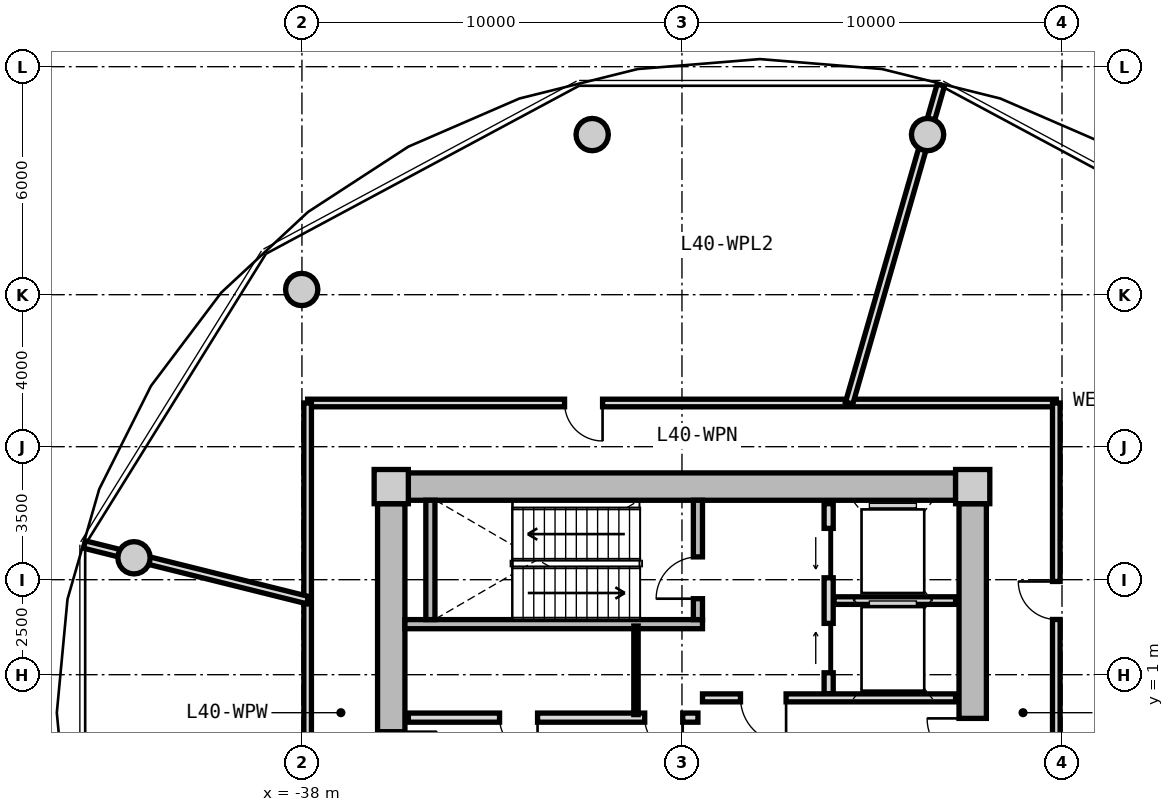
"""IFC4 building model, lengths in metres.
Left out: names, types, materials, properties, quantities, classifications, styles, units other than length and angle.
Written with IfcOpenShell. Run it as: python <this file> out.ifc"""

import sys

from ifc_helpers import new_model, si_unit, direction, frame, frame_2d, origin, origin_2d, place, context, subcontext, project, spatial, rectangle, circle, extrude, source, transform, mapped, element, fill, save


model = new_model("IFC4")
c1 = context("Model", 3, precision=1e-05, world=origin(), true_north=direction((0.0, 1.0)))
c2 = subcontext(c1, "Body", "Model", "MODEL_VIEW")
j1 = project(units=[si_unit("LENGTHUNIT", "METRE"), si_unit("PLANEANGLEUNIT", "RADIAN")], contexts=[c1])
p1 = place(None, origin())
s1 = spatial("IfcSite", under=j1, at=p1, CompositionType="ELEMENT")
p2 = place(p1, origin())
s2 = spatial("IfcBuilding", under=s1, at=p2, CompositionType="ELEMENT")
p3 = place(p2, frame((0.0, 0.0, 129.8)))
s3 = spatial("IfcBuildingStorey", under=s2, at=p3, CompositionType="ELEMENT", Elevation=129.8)
m1 = source(origin(), c2, "Body", "SweptSolid", [
    extrude(rectangle(XDim=0.9, YDim=0.9, at=origin_2d()), origin(), (0.0, 0.0, 1.0), 4.5),
])
for number, where, z_axis, x_axis in (
    (1, (-20.35, 5.95, 0.0), (0.0, 0.0, 1.0), (1.0, 0.0, 0.0)),
    (2, (-35.65, 5.95, 0.0), (0.0, 0.0, 1.0), (1.0, 0.0, 0.0)),
):
    element("IfcColumn", number, at=place(p3, frame(where, z_axis=z_axis, x_axis=x_axis)), inside=s3, PredefinedType="COLUMN", context=c2, shape_type="MappedRepresentation", body=[
        mapped(m1, transform((0.0, 0.0, 0.0), x_axis=(1.0, 0.0, 0.0), y_axis=(0.0, 1.0, 0.0), z_axis=(0.0, 0.0, 1.0), scale=1.0)),
    ])
m2 = source(origin(), c2, "Body", "SweptSolid", [
    extrude(rectangle(XDim=14.4, YDim=0.72, at=frame_2d((7.2, 0.0))), origin(), (0.0, 0.0, 1.0), 4.08),
])
p4 = place(p3, frame((-35.2, 5.95, 0.0), z_axis=(0.0, 0.0, 1.0), x_axis=(1.0, 0.0, 0.0)))
e3 = element("IfcWall", 3, at=p4, inside=s3, PredefinedType="SHEAR", context=c2, shape_type="MappedRepresentation", body=[
    mapped(m2, transform((0.0, 0.0, 0.0), x_axis=(1.0, 0.0, 0.0), y_axis=(0.0, 1.0, 0.0), z_axis=(0.0, 0.0, 1.0), scale=1.0)),
])
m3 = source(origin(), c2, "Body", "SweptSolid", [
    extrude(rectangle(XDim=11.0, YDim=0.72, at=frame_2d((5.5, 0.0))), origin(), (0.0, 0.0, 1.0), 4.08),
])
p5 = place(p3, frame((-35.65, -5.5, 0.0), z_axis=(0.0, 0.0, 1.0), x_axis=(0.0, 1.0, 0.0)))
e4 = element("IfcWall", 4, at=p5, inside=s3, PredefinedType="SHEAR", context=c2, shape_type="MappedRepresentation", body=[
    mapped(m3, transform((0.0, 0.0, 0.0), x_axis=(1.0, 0.0, 0.0), y_axis=(0.0, 1.0, 0.0), z_axis=(0.0, 0.0, 1.0), scale=1.0)),
])
p6 = place(p5, frame((3.8, 0.0, 0.0)))
e5 = element("IfcOpeningElement", 5, at=p6, cuts=e4, PredefinedType="OPENING", context=c2, shape_type="SweptSolid", body=[
    extrude(rectangle(XDim=1.2, YDim=2.15, at=frame_2d((0.6, 1.075))), frame((0.0, 0.37, 0.0), z_axis=(0.0, -1.0, 0.0), x_axis=(1.0, 0.0, 0.0)), (0.0, 0.0, 1.0), 0.74),
])
p7 = place(p3, frame((-20.35, 5.5, 0.0), z_axis=(0.0, 0.0, 1.0), x_axis=(0.0, -1.0, 0.0)))
e6 = element("IfcWall", 6, at=p7, inside=s3, PredefinedType="SHEAR", context=c2, shape_type="MappedRepresentation", body=[
    mapped(m3, transform((0.0, 0.0, 0.0), x_axis=(1.0, 0.0, 0.0), y_axis=(0.0, 1.0, 0.0), z_axis=(0.0, 0.0, 1.0), scale=1.0)),
])
p8 = place(p7, frame((5.65, 0.0, 0.0)))
e7 = element("IfcOpeningElement", 7, at=p8, cuts=e6, PredefinedType="OPENING", context=c2, shape_type="SweptSolid", body=[
    extrude(rectangle(XDim=1.2, YDim=2.15, at=frame_2d((0.6, 1.075))), frame((0.0, 0.37, 0.0), z_axis=(0.0, -1.0, 0.0), x_axis=(1.0, 0.0, 0.0)), (0.0, 0.0, 1.0), 0.74),
])
p9 = place(p7, frame((9.3, 0.0, 0.0)))
e8 = element("IfcOpeningElement", 8, at=p9, cuts=e6, PredefinedType="OPENING", context=c2, shape_type="SweptSolid", body=[
    extrude(rectangle(XDim=1.0, YDim=2.1, at=frame_2d((0.5, 1.05))), frame((0.0, 0.37, 0.0), z_axis=(0.0, -1.0, 0.0), x_axis=(1.0, 0.0, 0.0)), (0.0, 0.0, 1.0), 0.74),
])
m4 = source(origin(), c2, "Body", "SweptSolid", [
    extrude(circle(Radius=0.425, at=origin_2d()), origin(), (0.0, 0.0, 1.0), 4.08),
])
for number, where, z_axis, x_axis in (
    (9, (-21.537, 15.213, 0.0), (0.0, 0.0, 1.0), (1.0, 0.0, 0.0)),
    (10, (-30.363, 15.213, 0.0), (0.0, 0.0, 1.0), (1.0, 0.0, 0.0)),
    (11, (-38.006, 11.137, 0.0), (0.0, 0.0, 1.0), (1.0, 0.0, 0.0)),
    (12, (-42.419, 4.076, 0.0), (0.0, 0.0, 1.0), (1.0, 0.0, 0.0)),
):
    element("IfcColumn", number, at=place(p3, frame(where, z_axis=z_axis, x_axis=x_axis)), inside=s3, PredefinedType="COLUMN", context=c2, shape_type="MappedRepresentation", body=[
        mapped(m4, transform((0.0, 0.0, 0.0), x_axis=(1.0, 0.0, 0.0), y_axis=(0.0, 1.0, 0.0), z_axis=(0.0, 0.0, 1.0), scale=1.0)),
    ])
m5 = source(origin(), c2, "Body", "SweptSolid", [
    extrude(rectangle(XDim=7.83, YDim=0.24, at=frame_2d((3.915, 0.0))), origin(), (0.0, 0.0, 1.0), 4.08),
])
p10 = place(p3, frame((-35.29, 2.33, 0.0), z_axis=(0.0, 0.0, 1.0), x_axis=(1.0, 0.0, 0.0)))
e13 = element("IfcWall", 13, at=p10, inside=s3, PredefinedType="PARTITIONING", context=c2, shape_type="MappedRepresentation", body=[
    mapped(m5, transform((0.0, 0.0, 0.0), x_axis=(1.0, 0.0, 0.0), y_axis=(0.0, 1.0, 0.0), z_axis=(0.0, 0.0, 1.0), scale=1.0)),
])
m6 = source(origin(), c2, "Body", "SweptSolid", [
    extrude(rectangle(XDim=3.14, YDim=0.24, at=frame_2d((1.57, 0.0))), origin(), (0.0, 0.0, 1.0), 4.08),
])
p11 = place(p3, frame((-34.62, 2.45, 0.0), z_axis=(0.0, 0.0, 1.0), x_axis=(0.0, 1.0, 0.0)))
e14 = element("IfcWall", 14, at=p11, inside=s3, PredefinedType="PARTITIONING", context=c2, shape_type="MappedRepresentation", body=[
    mapped(m6, transform((0.0, 0.0, 0.0), x_axis=(1.0, 0.0, 0.0), y_axis=(0.0, 1.0, 0.0), z_axis=(0.0, 0.0, 1.0), scale=1.0)),
])
p12 = place(p3, frame((-27.58, 2.45, 0.0), z_axis=(0.0, 0.0, 1.0), x_axis=(0.0, 1.0, 0.0)))
e15 = element("IfcWall", 15, at=p12, inside=s3, PredefinedType="PARTITIONING", context=c2, shape_type="MappedRepresentation", body=[
    mapped(m6, transform((0.0, 0.0, 0.0), x_axis=(1.0, 0.0, 0.0), y_axis=(0.0, 1.0, 0.0), z_axis=(0.0, 0.0, 1.0), scale=1.0)),
])
p13 = place(p12, frame((0.55, 0.0, 0.0)))
e16 = element("IfcOpeningElement", 16, at=p13, cuts=e15, PredefinedType="OPENING", context=c2, shape_type="SweptSolid", body=[
    extrude(rectangle(XDim=1.1, YDim=2.15, at=frame_2d((0.55, 1.075))), frame((0.0, 0.13, 0.0), z_axis=(0.0, -1.0, 0.0), x_axis=(1.0, 0.0, 0.0)), (0.0, 0.0, 1.0), 0.26),
])
m7 = source(origin(), c2, "Body", "SweptSolid", [
    extrude(rectangle(XDim=5.0, YDim=0.24, at=frame_2d((2.5, 0.0))), origin(), (0.0, 0.0, 1.0), 4.065),
])
p14 = place(p3, frame((-24.14, 0.5, 0.0), z_axis=(0.0, 0.0, 1.0), x_axis=(0.0, 1.0, 0.0)))
e17 = element("IfcWall", 17, at=p14, inside=s3, PredefinedType="PARTITIONING", context=c2, shape_type="MappedRepresentation", body=[
    mapped(m7, transform((0.0, 0.0, 0.0), x_axis=(1.0, 0.0, 0.0), y_axis=(0.0, 1.0, 0.0), z_axis=(0.0, 0.0, 1.0), scale=1.0)),
])
p15 = place(p14, frame((3.05, 0.0, 0.0)))
e18 = element("IfcOpeningElement", 18, at=p15, cuts=e17, PredefinedType="OPENING", context=c2, shape_type="SweptSolid", body=[
    extrude(rectangle(XDim=1.3, YDim=2.2, at=frame_2d((0.65, 1.1))), frame((0.0, 0.13, 0.0), z_axis=(0.0, -1.0, 0.0), x_axis=(1.0, 0.0, 0.0)), (0.0, 0.0, 1.0), 0.26),
])
p16 = place(p14, frame((0.55, 0.0, 0.0)))
e19 = element("IfcOpeningElement", 19, at=p16, cuts=e17, PredefinedType="OPENING", context=c2, shape_type="SweptSolid", body=[
    extrude(rectangle(XDim=1.3, YDim=2.2, at=frame_2d((0.65, 1.1))), frame((0.0, 0.13, 0.0), z_axis=(0.0, -1.0, 0.0), x_axis=(1.0, 0.0, 0.0)), (0.0, 0.0, 1.0), 0.26),
])
m8 = source(origin(), c2, "Body", "SweptSolid", [
    extrude(rectangle(XDim=3.2, YDim=0.2, at=frame_2d((1.6, 0.0))), origin(), (0.0, 0.0, 1.0), 4.065),
])
p17 = place(p3, frame((-24.0, 2.95, 0.0), z_axis=(0.0, 0.0, 1.0), x_axis=(1.0, 0.0, 0.0)))
e20 = element("IfcWall", 20, at=p17, inside=s3, PredefinedType="PARTITIONING", context=c2, shape_type="MappedRepresentation", body=[
    mapped(m8, transform((0.0, 0.0, 0.0), x_axis=(1.0, 0.0, 0.0), y_axis=(0.0, 1.0, 0.0), z_axis=(0.0, 0.0, 1.0), scale=1.0)),
])
m9 = source(origin(), c2, "Body", "SweptSolid", [
    extrude(rectangle(XDim=6.66, YDim=0.21, at=frame_2d((3.33, 0.0))), origin(), (0.0, 0.0, 1.0), 4.065),
])
p18 = place(p3, frame((-27.46, 0.39, 0.0), z_axis=(0.0, 0.0, 1.0), x_axis=(1.0, 0.0, 0.0)))
e21 = element("IfcWall", 21, at=p18, inside=s3, PredefinedType="PARTITIONING", context=c2, shape_type="MappedRepresentation", body=[
    mapped(m9, transform((0.0, 0.0, 0.0), x_axis=(1.0, 0.0, 0.0), y_axis=(0.0, 1.0, 0.0), z_axis=(0.0, 0.0, 1.0), scale=1.0)),
])
p19 = place(p18, frame((1.0, 0.0, 0.0)))
e22 = element("IfcOpeningElement", 22, at=p19, cuts=e21, PredefinedType="OPENING", context=c2, shape_type="SweptSolid", body=[
    extrude(rectangle(XDim=1.2, YDim=2.15, at=frame_2d((0.6, 1.075))), frame((0.0, 0.115, 0.0), z_axis=(0.0, -1.0, 0.0), x_axis=(1.0, 0.0, 0.0)), (0.0, 0.0, 1.0), 0.23),
])
m10 = source(origin(), c2, "Body", "SweptSolid", [
    extrude(rectangle(XDim=7.62, YDim=0.24, at=frame_2d((3.81, 0.0))), origin(), (0.0, 0.0, 1.0), 4.065),
])
p20 = place(p3, frame((-35.2, -0.13, 0.0), z_axis=(0.0, 0.0, 1.0), x_axis=(1.0, 0.0, 0.0)))
e23 = element("IfcWall", 23, at=p20, inside=s3, PredefinedType="PARTITIONING", context=c2, shape_type="MappedRepresentation", body=[
    mapped(m10, transform((0.0, 0.0, 0.0), x_axis=(1.0, 0.0, 0.0), y_axis=(0.0, 1.0, 0.0), z_axis=(0.0, 0.0, 1.0), scale=1.0)),
])
p21 = place(p20, frame((6.22, 0.0, 0.0)))
e24 = element("IfcOpeningElement", 24, at=p21, cuts=e23, PredefinedType="OPENING", context=c2, shape_type="SweptSolid", body=[
    extrude(rectangle(XDim=1.0, YDim=2.1, at=frame_2d((0.5, 1.05))), frame((0.0, 0.13, 0.0), z_axis=(0.0, -1.0, 0.0), x_axis=(1.0, 0.0, 0.0)), (0.0, 0.0, 1.0), 0.26),
])
p22 = place(p20, frame((2.4, 0.0, 0.0)))
e25 = element("IfcOpeningElement", 25, at=p22, cuts=e23, PredefinedType="OPENING", context=c2, shape_type="SweptSolid", body=[
    extrude(rectangle(XDim=1.0, YDim=2.1, at=frame_2d((0.5, 1.05))), frame((0.0, 0.13, 0.0), z_axis=(0.0, -1.0, 0.0), x_axis=(1.0, 0.0, 0.0)), (0.0, 0.0, 1.0), 0.26),
])
m11 = source(origin(), c2, "Body", "SweptSolid", [
    extrude(rectangle(XDim=2.33, YDim=0.115, at=frame_2d((1.165, 0.0))), origin(), (0.0, 0.0, 1.0), 4.065),
])
p23 = place(p3, frame((-29.21, -0.05, 0.0), z_axis=(0.0, 0.0, 1.0), x_axis=(0.0, 1.0, 0.0)))
e26 = element("IfcWall", 26, at=p23, inside=s3, PredefinedType="PARTITIONING", context=c2, shape_type="MappedRepresentation", body=[
    mapped(m11, transform((0.0, 0.0, 0.0), x_axis=(1.0, 0.0, 0.0), y_axis=(0.0, 1.0, 0.0), z_axis=(0.0, 0.0, 1.0), scale=1.0)),
])
m12 = source(origin(), c2, "Body", "SweptSolid", [
    extrude(rectangle(XDim=19.7, YDim=0.2, at=frame_2d((9.85, 0.0))), origin(), (0.0, 0.0, 1.0), 4.065),
])
p24 = place(p3, frame((-37.85, 8.15, 0.0), z_axis=(0.0, 0.0, 1.0), x_axis=(1.0, 0.0, 0.0)))
e27 = element("IfcWall", 27, at=p24, inside=s3, PredefinedType="PARTITIONING", context=c2, shape_type="MappedRepresentation", body=[
    mapped(m12, transform((0.0, 0.0, 0.0), x_axis=(1.0, 0.0, 0.0), y_axis=(0.0, 1.0, 0.0), z_axis=(0.0, 0.0, 1.0), scale=1.0)),
])
p25 = place(p24, frame((6.761, 0.0, 0.0)))
e28 = element("IfcOpeningElement", 28, at=p25, cuts=e27, PredefinedType="OPENING", context=c2, shape_type="SweptSolid", body=[
    extrude(rectangle(XDim=1.0, YDim=2.1, at=frame_2d((0.5, 1.05))), frame((0.0, 0.11, 0.0), z_axis=(0.0, -1.0, 0.0), x_axis=(1.0, 0.0, 0.0)), (0.0, 0.0, 1.0), 0.22),
])
m13 = source(origin(), c2, "Body", "SweptSolid", [
    extrude(rectangle(XDim=16.3, YDim=0.2, at=frame_2d((8.15, 0.0))), origin(), (0.0, 0.0, 1.0), 4.065),
])
p26 = place(p3, frame((-37.85, -8.15, 0.0), z_axis=(0.0, 0.0, 1.0), x_axis=(0.0, 1.0, 0.0)))
e29 = element("IfcWall", 29, at=p26, inside=s3, PredefinedType="PARTITIONING", context=c2, shape_type="MappedRepresentation", body=[
    mapped(m13, transform((0.0, 0.0, 0.0), x_axis=(1.0, 0.0, 0.0), y_axis=(0.0, 1.0, 0.0), z_axis=(0.0, 0.0, 1.0), scale=1.0)),
])
p27 = place(p26, frame((5.211, 0.0, 0.0)))
e30 = element("IfcOpeningElement", 30, at=p27, cuts=e29, PredefinedType="OPENING", context=c2, shape_type="SweptSolid", body=[
    extrude(rectangle(XDim=1.0, YDim=2.1, at=frame_2d((0.5, 1.05))), frame((0.0, 0.11, 0.0), z_axis=(0.0, -1.0, 0.0), x_axis=(1.0, 0.0, 0.0)), (0.0, 0.0, 1.0), 0.22),
])
p28 = place(p3, frame((-18.15, 8.15, 0.0), z_axis=(0.0, 0.0, 1.0), x_axis=(0.0, -1.0, 0.0)))
e31 = element("IfcWall", 31, at=p28, inside=s3, PredefinedType="PARTITIONING", context=c2, shape_type="MappedRepresentation", body=[
    mapped(m13, transform((0.0, 0.0, 0.0), x_axis=(1.0, 0.0, 0.0), y_axis=(0.0, 1.0, 0.0), z_axis=(0.0, 0.0, 1.0), scale=1.0)),
])
p29 = place(p28, frame((4.697, 0.0, 0.0)))
e32 = element("IfcOpeningElement", 32, at=p29, cuts=e31, PredefinedType="OPENING", context=c2, shape_type="SweptSolid", body=[
    extrude(rectangle(XDim=1.0, YDim=2.1, at=frame_2d((0.5, 1.05))), frame((0.0, 0.11, 0.0), z_axis=(0.0, -1.0, 0.0), x_axis=(1.0, 0.0, 0.0)), (0.0, 0.0, 1.0), 0.22),
])
m14 = source(origin(), c2, "Body", "SweptSolid", [
    extrude(rectangle(XDim=8.708, YDim=0.2, at=frame_2d((4.354, 0.0))), origin(), (0.0, 0.0, 1.0), 4.065),
])
p30 = place(p3, frame((-23.6, 8.15, 0.0), z_axis=(0.0, 0.0, 1.0), x_axis=(0.277019790717, 0.960864212858, 0.0)))
e33 = element("IfcWall", 33, at=p30, inside=s3, PredefinedType="PARTITIONING", context=c2, shape_type="MappedRepresentation", body=[
    mapped(m14, transform((0.0, 0.0, 0.0), x_axis=(1.0, 0.0, 0.0), y_axis=(0.0, 1.0, 0.0), z_axis=(0.0, 0.0, 1.0), scale=1.0)),
])
m15 = source(origin(), c2, "Body", "SweptSolid", [
    extrude(rectangle(XDim=6.052, YDim=0.2, at=frame_2d((3.026, 0.0))), origin(), (0.0, 0.0, 1.0), 4.065),
])
p31 = place(p3, frame((-37.85, 2.963, 0.0), z_axis=(0.0, 0.0, 1.0), x_axis=(-0.970369863069, 0.24162435483, 0.0)))
e34 = element("IfcWall", 34, at=p31, inside=s3, PredefinedType="PARTITIONING", context=c2, shape_type="MappedRepresentation", body=[
    mapped(m15, transform((0.0, 0.0, 0.0), x_axis=(1.0, 0.0, 0.0), y_axis=(0.0, 1.0, 0.0), z_axis=(0.0, 0.0, 1.0), scale=1.0)),
])
m16 = source(origin(), c2, "Body", "SweptSolid", [
    extrude(rectangle(XDim=1.1, YDim=2.15, at=frame_2d((0.55, 1.075))), frame((0.0, 0.025, 0.0), z_axis=(0.0, -1.0, 0.0), x_axis=(1.0, 0.0, 0.0)), (0.0, 0.0, 1.0), 0.05),
])
p32 = place(p13, origin())
e35 = element("IfcDoor", 35, at=p32, inside=s3, OperationType="SINGLE_SWING_LEFT", PredefinedType="DOOR", context=c2, shape_type="MappedRepresentation", body=[
    mapped(m16, transform((0.0, 0.0, 0.0), x_axis=(1.0, 0.0, 0.0), y_axis=(0.0, 1.0, 0.0), z_axis=(0.0, 0.0, 1.0), scale=1.0)),
])
fill(e16, e35)
m17 = source(origin(), c2, "Body", "SweptSolid", [
    extrude(rectangle(XDim=1.3, YDim=2.2, at=frame_2d((0.65, 1.1))), frame((0.0, 0.025, 0.0), z_axis=(0.0, -1.0, 0.0), x_axis=(1.0, 0.0, 0.0)), (0.0, 0.0, 1.0), 0.05),
])
p33 = place(p15, origin())
e36 = element("IfcDoor", 36, at=p33, inside=s3, OperationType="SLIDING_TO_LEFT", PredefinedType="DOOR", context=c2, shape_type="MappedRepresentation", body=[
    mapped(m17, transform((0.0, 0.0, 0.0), x_axis=(1.0, 0.0, 0.0), y_axis=(0.0, 1.0, 0.0), z_axis=(0.0, 0.0, 1.0), scale=1.0)),
])
fill(e18, e36)
p34 = place(p16, origin())
e37 = element("IfcDoor", 37, at=p34, inside=s3, OperationType="SLIDING_TO_RIGHT", PredefinedType="DOOR", context=c2, shape_type="MappedRepresentation", body=[
    mapped(m17, transform((0.0, 0.0, 0.0), x_axis=(1.0, 0.0, 0.0), y_axis=(0.0, 1.0, 0.0), z_axis=(0.0, 0.0, 1.0), scale=1.0)),
])
fill(e19, e37)
m18 = source(origin(), c2, "Body", "SweptSolid", [
    extrude(rectangle(XDim=1.2, YDim=2.15, at=frame_2d((0.6, 1.075))), frame((0.0, 0.025, 0.0), z_axis=(0.0, -1.0, 0.0), x_axis=(1.0, 0.0, 0.0)), (0.0, 0.0, 1.0), 0.05),
])
p35 = place(p19, frame((1.2, 0.0, 0.0), z_axis=(0.0, 0.0, 1.0), x_axis=(-1.0, 0.0, 0.0)))
e38 = element("IfcDoor", 38, at=p35, inside=s3, OperationType="SINGLE_SWING_LEFT", PredefinedType="DOOR", context=c2, shape_type="MappedRepresentation", body=[
    mapped(m18, transform((0.0, 0.0, 0.0), x_axis=(1.0, 0.0, 0.0), y_axis=(0.0, 1.0, 0.0), z_axis=(0.0, 0.0, 1.0), scale=1.0)),
])
fill(e22, e38)
p36 = place(p8, frame((1.2, 0.0, 0.0), z_axis=(0.0, 0.0, 1.0), x_axis=(-1.0, 0.0, 0.0)))
e39 = element("IfcDoor", 39, at=p36, inside=s3, OperationType="SINGLE_SWING_RIGHT", PredefinedType="DOOR", context=c2, shape_type="MappedRepresentation", body=[
    mapped(m18, transform((0.0, 0.0, 0.0), x_axis=(1.0, 0.0, 0.0), y_axis=(0.0, 1.0, 0.0), z_axis=(0.0, 0.0, 1.0), scale=1.0)),
])
fill(e7, e39)
m19 = source(origin(), c2, "Body", "SweptSolid", [
    extrude(rectangle(XDim=1.0, YDim=2.1, at=frame_2d((0.5, 1.05))), frame((0.0, 0.025, 0.0), z_axis=(0.0, -1.0, 0.0), x_axis=(1.0, 0.0, 0.0)), (0.0, 0.0, 1.0), 0.05),
])
p37 = place(p21, frame((1.0, 0.0, 0.0), z_axis=(0.0, 0.0, 1.0), x_axis=(-1.0, 0.0, 0.0)))
e40 = element("IfcDoor", 40, at=p37, inside=s3, OperationType="SINGLE_SWING_LEFT", PredefinedType="DOOR", context=c2, shape_type="MappedRepresentation", body=[
    mapped(m19, transform((0.0, 0.0, 0.0), x_axis=(1.0, 0.0, 0.0), y_axis=(0.0, 1.0, 0.0), z_axis=(0.0, 0.0, 1.0), scale=1.0)),
])
fill(e24, e40)
p38 = place(p22, frame((1.0, 0.0, 0.0), z_axis=(0.0, 0.0, 1.0), x_axis=(-1.0, 0.0, 0.0)))
e41 = element("IfcDoor", 41, at=p38, inside=s3, OperationType="SINGLE_SWING_LEFT", PredefinedType="DOOR", context=c2, shape_type="MappedRepresentation", body=[
    mapped(m19, transform((0.0, 0.0, 0.0), x_axis=(1.0, 0.0, 0.0), y_axis=(0.0, 1.0, 0.0), z_axis=(0.0, 0.0, 1.0), scale=1.0)),
])
fill(e25, e41)
p39 = place(p29, frame((1.0, 0.0, 0.0), z_axis=(0.0, 0.0, 1.0), x_axis=(-1.0, 0.0, 0.0)))
e42 = element("IfcDoor", 42, at=p39, inside=s3, OperationType="SINGLE_SWING_RIGHT", PredefinedType="DOOR", context=c2, shape_type="MappedRepresentation", body=[
    mapped(m19, transform((0.0, 0.0, 0.0), x_axis=(1.0, 0.0, 0.0), y_axis=(0.0, 1.0, 0.0), z_axis=(0.0, 0.0, 1.0), scale=1.0)),
])
fill(e32, e42)
p40 = place(p25, frame((1.0, 0.0, 0.0), z_axis=(0.0, 0.0, 1.0), x_axis=(-1.0, 0.0, 0.0)))
e43 = element("IfcDoor", 43, at=p40, inside=s3, OperationType="SINGLE_SWING_LEFT", PredefinedType="DOOR", context=c2, shape_type="MappedRepresentation", body=[
    mapped(m19, transform((0.0, 0.0, 0.0), x_axis=(1.0, 0.0, 0.0), y_axis=(0.0, 1.0, 0.0), z_axis=(0.0, 0.0, 1.0), scale=1.0)),
])
fill(e28, e43)
save(model, sys.argv[1])
